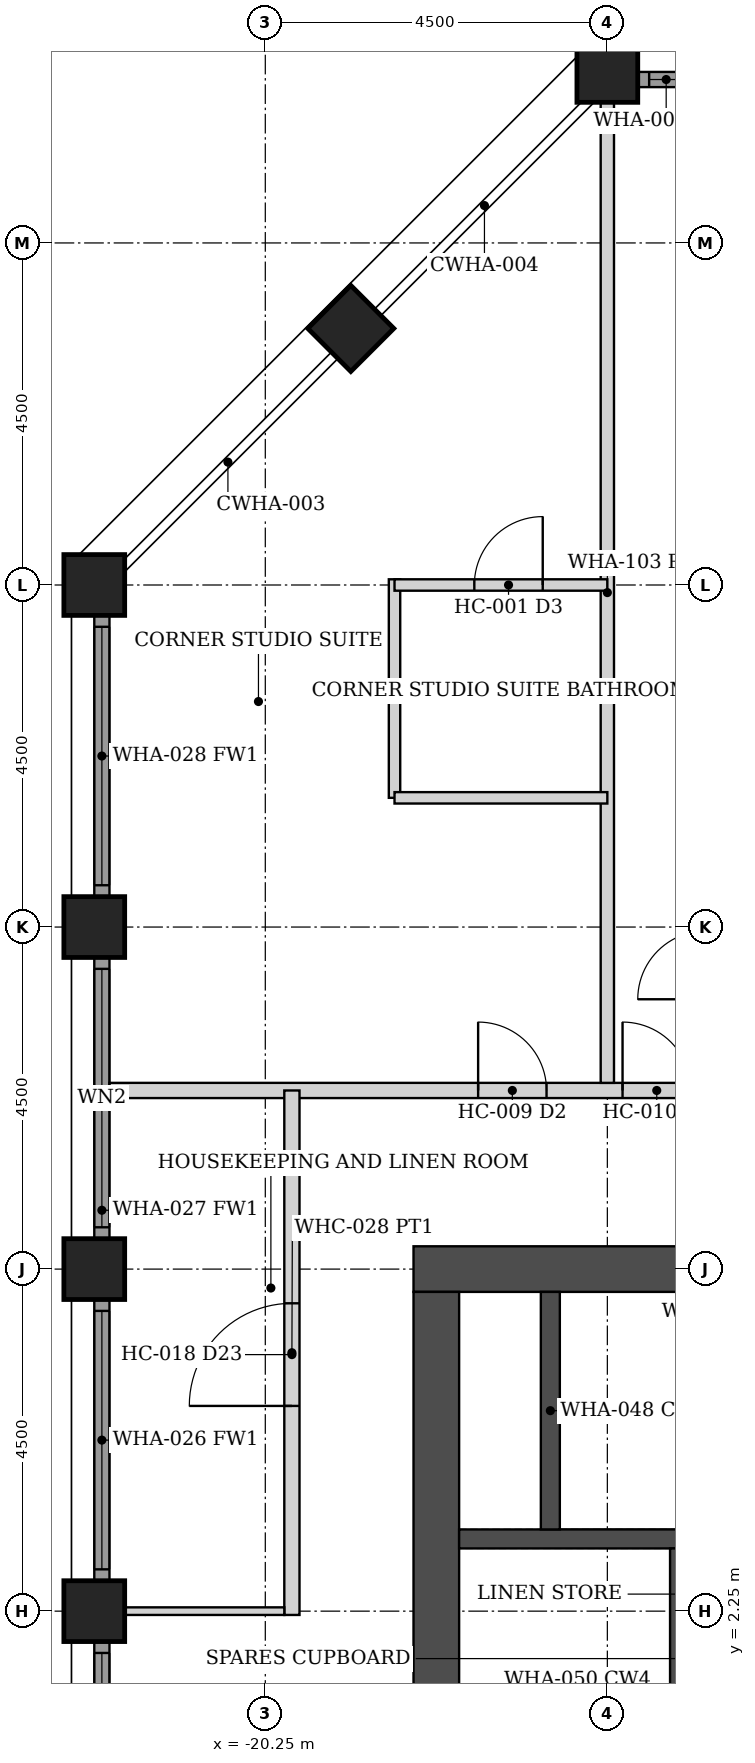
"""IFC4 building model, lengths in metres.
Left out: names, types, materials, properties, quantities, classifications, styles, units other than length and angle.
Written with IfcOpenShell. Run it as: python <this file> out.ifc"""

import sys

from ifc_helpers import new_model, si_unit, direction, frame, frame_2d, origin, origin_2d, place, context, subcontext, project, spatial, rectangle, hollow_rectangle, extrude, element, fill, save


model = new_model("IFC4")
c1 = context("Model", 3, precision=1e-05, world=origin(), true_north=direction((0.0, 1.0)))
c2 = subcontext(c1, "Body", "Model", "MODEL_VIEW")
j1 = project(units=[si_unit("LENGTHUNIT", "METRE"), si_unit("PLANEANGLEUNIT", "RADIAN")], contexts=[c1])
p1 = place(None, origin())
s1 = spatial("IfcSite", under=j1, at=p1, CompositionType="ELEMENT")
p2 = place(p1, origin())
s2 = spatial("IfcBuilding", under=s1, at=p2, CompositionType="ELEMENT")
p3 = place(p2, frame((0.0, 0.0, 140.0)))
s3 = spatial("IfcBuildingStorey", under=s2, at=p3, CompositionType="ELEMENT", Elevation=140.0)
for number, where, z_axis, x_axis in (
    (1, (-15.75, 22.5, 0.0), (0.0, 0.0, 1.0), (0.0, 1.0, 0.0)),
    (2, (-22.5, 2.25, 0.0), (0.0, 0.0, 1.0), (1.0, 0.0, 0.0)),
    (3, (-22.5, 6.75, 0.0), (0.0, 0.0, 1.0), (1.0, 0.0, 0.0)),
    (4, (-22.5, 11.25, 0.0), (0.0, 0.0, 1.0), (1.0, 0.0, 0.0)),
    (5, (-22.5, 15.75, 0.0), (0.0, 0.0, 1.0), (1.0, 0.0, 0.0)),
    (6, (-19.125, 19.125, 0.0), (0.0, 0.0, 1.0), (0.707, -0.707, 0.0)),
):
    element("IfcColumn", number, at=place(p3, frame(where, z_axis=z_axis, x_axis=x_axis)), inside=s3, PredefinedType="COLUMN", context=c2, shape_type="SweptSolid", body=[
        extrude(hollow_rectangle(XDim=0.8, YDim=0.8, WallThickness=0.05, at=origin_2d()), origin(), (0.0, 0.0, 1.0), 3.6),
    ])
p4 = place(p3, frame((-8.7, 6.75, 0.0), z_axis=(0.0, 0.0, 1.0), x_axis=(-1.0, 0.0, 0.0)))
e7 = element("IfcWall", 7, at=p4, inside=s3, PredefinedType="SHEAR", context=c2, shape_type="SweptSolid", body=[
    extrude(rectangle(XDim=9.6, YDim=0.6, at=frame_2d((4.8, 0.0))), origin(), (0.0, 0.0, 1.0), 3.6),
])
p5 = place(p3, frame((-18.0, -6.45, 0.0), z_axis=(0.0, 0.0, 1.0), x_axis=(0.0, 1.0, 0.0)))
e8 = element("IfcWall", 8, at=p5, inside=s3, PredefinedType="SHEAR", context=c2, shape_type="SweptSolid", body=[
    extrude(rectangle(XDim=12.9, YDim=0.6, at=frame_2d((6.45, 0.0))), origin(), (0.0, 0.0, 1.0), 3.6),
])
p6 = place(p3, frame((-9.3, 3.2, 0.0), z_axis=(0.0, 0.0, 1.0), x_axis=(-1.0, 0.0, 0.0)))
e9 = element("IfcWall", 9, at=p6, inside=s3, PredefinedType="SHEAR", context=c2, shape_type="SweptSolid", body=[
    extrude(rectangle(XDim=8.4, YDim=0.25, at=frame_2d((4.2, 0.0))), origin(), (0.0, 0.0, 1.0), 3.6),
])
p7 = place(p3, frame((-16.5, 3.325, 0.0), z_axis=(0.0, 0.0, 1.0), x_axis=(0.0, 1.0, 0.0)))
e10 = element("IfcWall", 10, at=p7, inside=s3, PredefinedType="SHEAR", context=c2, shape_type="SweptSolid", body=[
    extrude(rectangle(XDim=3.125, YDim=0.25, at=frame_2d((1.562, 0.0))), origin(), (0.0, 0.0, 1.0), 3.6),
])
p8 = place(p3, frame((-14.8, -3.075, 0.0), z_axis=(0.0, 0.0, 1.0), x_axis=(0.0, 1.0, 0.0)))
e11 = element("IfcWall", 11, at=p8, inside=s3, PredefinedType="SHEAR", context=c2, shape_type="SweptSolid", body=[
    extrude(rectangle(XDim=6.15, YDim=0.25, at=frame_2d((3.075, 0.0))), origin(), (0.0, 0.0, 1.0), 3.6),
])
p9 = place(p3, frame((-15.345, 22.4, 0.0), z_axis=(0.0, 0.0, 1.0), x_axis=(1.0, 0.0, 0.0)))
e12 = element("IfcWall", 12, at=p9, inside=s3, PredefinedType="SOLIDWALL", context=c2, shape_type="SweptSolid", body=[
    extrude(rectangle(XDim=3.69, YDim=0.2, at=frame_2d((1.845, 0.0))), origin(), (0.0, 0.0, 1.0), 2.479),
])
p10 = place(p9, frame((0.145, 0.0, 0.3)))
e13 = element("IfcOpeningElement", 13, at=p10, cuts=e12, PredefinedType="OPENING", context=c2, shape_type="SweptSolid", body=[
    extrude(rectangle(XDim=3.4, YDim=2.029, at=frame_2d((1.7, 1.015))), frame((0.0, 0.11, 0.0), z_axis=(0.0, -1.0, 0.0), x_axis=(1.0, 0.0, 0.0)), (0.0, 0.0, 1.0), 0.22),
])
p11 = place(p3, frame((-22.4, -1.845, 0.0), z_axis=(0.0, 0.0, 1.0), x_axis=(0.0, 1.0, 0.0)))
e14 = element("IfcWall", 14, at=p11, inside=s3, PredefinedType="SOLIDWALL", context=c2, shape_type="SweptSolid", body=[
    extrude(rectangle(XDim=3.69, YDim=0.2, at=frame_2d((1.845, 0.0))), origin(), (0.0, 0.0, 1.0), 2.479),
])
p12 = place(p11, frame((0.145, 0.0, 0.3)))
e15 = element("IfcOpeningElement", 15, at=p12, cuts=e14, PredefinedType="OPENING", context=c2, shape_type="SweptSolid", body=[
    extrude(rectangle(XDim=3.4, YDim=2.029, at=frame_2d((1.7, 1.015))), frame((0.0, 0.11, 0.0), z_axis=(0.0, -1.0, 0.0), x_axis=(1.0, 0.0, 0.0)), (0.0, 0.0, 1.0), 0.22),
])
p13 = place(p3, frame((-22.4, 2.655, 0.0), z_axis=(0.0, 0.0, 1.0), x_axis=(0.0, 1.0, 0.0)))
e16 = element("IfcWall", 16, at=p13, inside=s3, PredefinedType="SOLIDWALL", context=c2, shape_type="SweptSolid", body=[
    extrude(rectangle(XDim=3.69, YDim=0.2, at=frame_2d((1.845, 0.0))), origin(), (0.0, 0.0, 1.0), 2.479),
])
p14 = place(p13, frame((0.145, 0.0, 0.3)))
e17 = element("IfcOpeningElement", 17, at=p14, cuts=e16, PredefinedType="OPENING", context=c2, shape_type="SweptSolid", body=[
    extrude(rectangle(XDim=3.4, YDim=2.029, at=frame_2d((1.7, 1.015))), frame((0.0, 0.11, 0.0), z_axis=(0.0, -1.0, 0.0), x_axis=(1.0, 0.0, 0.0)), (0.0, 0.0, 1.0), 0.22),
])
p15 = place(p3, frame((-22.4, 7.155, 0.0), z_axis=(0.0, 0.0, 1.0), x_axis=(0.0, 1.0, 0.0)))
e18 = element("IfcWall", 18, at=p15, inside=s3, PredefinedType="SOLIDWALL", context=c2, shape_type="SweptSolid", body=[
    extrude(rectangle(XDim=3.69, YDim=0.2, at=frame_2d((1.845, 0.0))), origin(), (0.0, 0.0, 1.0), 2.479),
])
p16 = place(p15, frame((0.145, 0.0, 0.3)))
e19 = element("IfcOpeningElement", 19, at=p16, cuts=e18, PredefinedType="OPENING", context=c2, shape_type="SweptSolid", body=[
    extrude(rectangle(XDim=3.4, YDim=2.029, at=frame_2d((1.7, 1.015))), frame((0.0, 0.11, 0.0), z_axis=(0.0, -1.0, 0.0), x_axis=(1.0, 0.0, 0.0)), (0.0, 0.0, 1.0), 0.22),
])
p17 = place(p3, frame((-22.4, 11.655, 0.0), z_axis=(0.0, 0.0, 1.0), x_axis=(0.0, 1.0, 0.0)))
e20 = element("IfcWall", 20, at=p17, inside=s3, PredefinedType="SOLIDWALL", context=c2, shape_type="SweptSolid", body=[
    extrude(rectangle(XDim=3.69, YDim=0.2, at=frame_2d((1.845, 0.0))), origin(), (0.0, 0.0, 1.0), 2.479),
])
p18 = place(p17, frame((0.145, 0.0, 0.3)))
e21 = element("IfcOpeningElement", 21, at=p18, cuts=e20, PredefinedType="OPENING", context=c2, shape_type="SweptSolid", body=[
    extrude(rectangle(XDim=3.4, YDim=2.029, at=frame_2d((1.7, 1.015))), frame((0.0, 0.11, 0.0), z_axis=(0.0, -1.0, 0.0), x_axis=(1.0, 0.0, 0.0)), (0.0, 0.0, 1.0), 0.22),
])
p19 = place(p3, frame((-22.3, 9.1, 0.0), z_axis=(0.0, 0.0, 1.0), x_axis=(1.0, 0.0, 0.0)))
e22 = element("IfcWall", 22, at=p19, inside=s3, PredefinedType="PARTITIONING", context=c2, shape_type="SweptSolid", body=[
    extrude(rectangle(XDim=44.6, YDim=0.2, at=frame_2d((22.3, 0.0))), origin(), (0.0, 0.0, 1.0), 2.473),
])
p20 = place(p19, frame((6.75, 0.0, 0.0)))
e23 = element("IfcOpeningElement", 23, at=p20, cuts=e22, PredefinedType="OPENING", context=c2, shape_type="SweptSolid", body=[
    extrude(rectangle(XDim=0.9, YDim=2.1, at=frame_2d((0.45, 1.05))), frame((0.0, 0.11, 0.0), z_axis=(0.0, -1.0, 0.0), x_axis=(1.0, 0.0, 0.0)), (0.0, 0.0, 1.0), 0.22),
])
p21 = place(p19, frame((14.45, 0.0, 0.0)))
e24 = element("IfcOpeningElement", 24, at=p21, cuts=e22, PredefinedType="OPENING", context=c2, shape_type="SweptSolid", body=[
    extrude(rectangle(XDim=0.9, YDim=2.1, at=frame_2d((0.45, 1.05))), frame((0.0, 0.11, 0.0), z_axis=(0.0, -1.0, 0.0), x_axis=(1.0, 0.0, 0.0)), (0.0, 0.0, 1.0), 0.22),
])
p22 = place(p19, frame((15.75, 0.0, 0.0)))
e25 = element("IfcOpeningElement", 25, at=p22, cuts=e22, PredefinedType="OPENING", context=c2, shape_type="SweptSolid", body=[
    extrude(rectangle(XDim=0.9, YDim=2.1, at=frame_2d((0.45, 1.05))), frame((0.0, 0.11, 0.0), z_axis=(0.0, -1.0, 0.0), x_axis=(1.0, 0.0, 0.0)), (0.0, 0.0, 1.0), 0.22),
])
p23 = place(p19, frame((23.45, 0.0, 0.0)))
e26 = element("IfcOpeningElement", 26, at=p23, cuts=e22, PredefinedType="OPENING", context=c2, shape_type="SweptSolid", body=[
    extrude(rectangle(XDim=0.9, YDim=2.1, at=frame_2d((0.45, 1.05))), frame((0.0, 0.11, 0.0), z_axis=(0.0, -1.0, 0.0), x_axis=(1.0, 0.0, 0.0)), (0.0, 0.0, 1.0), 0.22),
])
p24 = place(p19, frame((24.75, 0.0, 0.0)))
e27 = element("IfcOpeningElement", 27, at=p24, cuts=e22, PredefinedType="OPENING", context=c2, shape_type="SweptSolid", body=[
    extrude(rectangle(XDim=0.9, YDim=2.1, at=frame_2d((0.45, 1.05))), frame((0.0, 0.11, 0.0), z_axis=(0.0, -1.0, 0.0), x_axis=(1.0, 0.0, 0.0)), (0.0, 0.0, 1.0), 0.22),
])
p25 = place(p19, frame((36.95, 0.0, 0.0)))
e28 = element("IfcOpeningElement", 28, at=p25, cuts=e22, PredefinedType="OPENING", context=c2, shape_type="SweptSolid", body=[
    extrude(rectangle(XDim=0.9, YDim=2.1, at=frame_2d((0.45, 1.05))), frame((0.0, 0.11, 0.0), z_axis=(0.0, -1.0, 0.0), x_axis=(1.0, 0.0, 0.0)), (0.0, 0.0, 1.0), 0.22),
])
p26 = place(p19, frame((38.85, 0.0, 0.0)))
e29 = element("IfcOpeningElement", 29, at=p26, cuts=e22, PredefinedType="OPENING", context=c2, shape_type="SweptSolid", body=[
    extrude(rectangle(XDim=0.9, YDim=2.1, at=frame_2d((0.45, 1.05))), frame((0.0, 0.11, 0.0), z_axis=(0.0, -1.0, 0.0), x_axis=(1.0, 0.0, 0.0)), (0.0, 0.0, 1.0), 0.22),
])
p27 = place(p19, frame((4.85, 0.0, 0.0)))
e30 = element("IfcOpeningElement", 30, at=p27, cuts=e22, PredefinedType="OPENING", context=c2, shape_type="SweptSolid", body=[
    extrude(rectangle(XDim=0.9, YDim=2.1, at=frame_2d((0.45, 1.05))), frame((0.0, 0.11, 0.0), z_axis=(0.0, -1.0, 0.0), x_axis=(1.0, 0.0, 0.0)), (0.0, 0.0, 1.0), 0.22),
])
p28 = place(p3, frame((-19.9, 2.2, 0.0), z_axis=(0.0, 0.0, 1.0), x_axis=(0.0, 1.0, 0.0)))
e31 = element("IfcWall", 31, at=p28, inside=s3, PredefinedType="PARTITIONING", context=c2, shape_type="SweptSolid", body=[
    extrude(rectangle(XDim=6.9, YDim=0.2, at=frame_2d((3.45, 0.0))), origin(), (0.0, 0.0, 1.0), 2.473),
])
p29 = place(p28, frame((2.75, 0.0, 0.0)))
e32 = element("IfcOpeningElement", 32, at=p29, cuts=e31, PredefinedType="OPENING", context=c2, shape_type="SweptSolid", body=[
    extrude(rectangle(XDim=1.35, YDim=2.1, at=frame_2d((0.675, 1.05))), frame((0.0, 0.11, 0.0), z_axis=(0.0, -1.0, 0.0), x_axis=(1.0, 0.0, 0.0)), (0.0, 0.0, 1.0), 0.22),
])
p30 = place(p3, frame((-15.75, 9.2, 0.0), z_axis=(0.0, 0.0, 1.0), x_axis=(0.0, 1.0, 0.0)))
e33 = element("IfcWall", 33, at=p30, inside=s3, PredefinedType="PARTITIONING", context=c2, shape_type="SweptSolid", body=[
    extrude(rectangle(XDim=12.9, YDim=0.175, at=frame_2d((6.45, 0.0))), origin(), (0.0, 0.0, 1.0), 2.473),
])
p31 = place(p3, frame((-18.55, 12.95, 0.0), z_axis=(0.0, 0.0, 1.0), x_axis=(0.0, 1.0, 0.0)))
e34 = element("IfcWall", 34, at=p31, inside=s3, PredefinedType="PARTITIONING", context=c2, shape_type="SweptSolid", body=[
    extrude(rectangle(XDim=2.875, YDim=0.15, at=frame_2d((1.438, 0.0))), origin(), (0.0, 0.0, 1.0), 2.473),
])
p32 = place(p3, frame((-18.55, 12.95, 0.0), z_axis=(0.0, 0.0, 1.0), x_axis=(1.0, 0.0, 0.0)))
e35 = element("IfcWall", 35, at=p32, inside=s3, PredefinedType="PARTITIONING", context=c2, shape_type="SweptSolid", body=[
    extrude(rectangle(XDim=2.8, YDim=0.15, at=frame_2d((1.4, 0.0))), origin(), (0.0, 0.0, 1.0), 2.473),
])
p33 = place(p3, frame((-18.55, 15.75, 0.0), z_axis=(0.0, 0.0, 1.0), x_axis=(1.0, 0.0, 0.0)))
e36 = element("IfcWall", 36, at=p33, inside=s3, PredefinedType="PARTITIONING", context=c2, shape_type="SweptSolid", body=[
    extrude(rectangle(XDim=2.8, YDim=0.15, at=frame_2d((1.4, 0.0))), origin(), (0.0, 0.0, 1.0), 2.473),
])
p34 = place(p33, frame((1.05, 0.0, 0.0)))
e37 = element("IfcOpeningElement", 37, at=p34, cuts=e36, PredefinedType="OPENING", context=c2, shape_type="SweptSolid", body=[
    extrude(rectangle(XDim=0.9, YDim=2.1, at=frame_2d((0.45, 1.05))), frame((0.0, 0.085, 0.0), z_axis=(0.0, -1.0, 0.0), x_axis=(1.0, 0.0, 0.0)), (0.0, 0.0, 1.0), 0.17),
])
p35 = place(p3, frame((-22.1, 2.25, 0.0), z_axis=(0.0, 0.0, 1.0), x_axis=(1.0, 0.0, 0.0)))
e38 = element("IfcWall", 38, at=p35, inside=s3, PredefinedType="PARTITIONING", context=c2, shape_type="SweptSolid", body=[
    extrude(rectangle(XDim=2.1, YDim=0.1, at=frame_2d((1.05, 0.0))), origin(), (0.0, 0.0, 1.0), 2.473),
])
p36 = place(p10, origin())
e39 = element("IfcWindow", 39, at=p36, inside=s3, PartitioningType="SINGLE_PANEL", PredefinedType="WINDOW", context=c2, shape_type="SweptSolid", body=[
    extrude(rectangle(XDim=3.4, YDim=2.029, at=frame_2d((1.7, 1.015))), frame((0.0, 0.03, 0.0), z_axis=(0.0, -1.0, 0.0), x_axis=(1.0, 0.0, 0.0)), (0.0, 0.0, 1.0), 0.06),
])
fill(e13, e39)
p37 = place(p12, origin())
e40 = element("IfcWindow", 40, at=p37, inside=s3, PartitioningType="SINGLE_PANEL", PredefinedType="WINDOW", context=c2, shape_type="SweptSolid", body=[
    extrude(rectangle(XDim=3.4, YDim=2.029, at=frame_2d((1.7, 1.015))), frame((0.0, 0.03, 0.0), z_axis=(0.0, -1.0, 0.0), x_axis=(1.0, 0.0, 0.0)), (0.0, 0.0, 1.0), 0.06),
])
fill(e15, e40)
p38 = place(p14, origin())
e41 = element("IfcWindow", 41, at=p38, inside=s3, PartitioningType="SINGLE_PANEL", PredefinedType="WINDOW", context=c2, shape_type="SweptSolid", body=[
    extrude(rectangle(XDim=3.4, YDim=2.029, at=frame_2d((1.7, 1.015))), frame((0.0, 0.03, 0.0), z_axis=(0.0, -1.0, 0.0), x_axis=(1.0, 0.0, 0.0)), (0.0, 0.0, 1.0), 0.06),
])
fill(e17, e41)
p39 = place(p16, origin())
e42 = element("IfcWindow", 42, at=p39, inside=s3, PartitioningType="SINGLE_PANEL", PredefinedType="WINDOW", context=c2, shape_type="SweptSolid", body=[
    extrude(rectangle(XDim=3.4, YDim=2.029, at=frame_2d((1.7, 1.015))), frame((0.0, 0.03, 0.0), z_axis=(0.0, -1.0, 0.0), x_axis=(1.0, 0.0, 0.0)), (0.0, 0.0, 1.0), 0.06),
])
fill(e19, e42)
p40 = place(p18, origin())
e43 = element("IfcWindow", 43, at=p40, inside=s3, PartitioningType="SINGLE_PANEL", PredefinedType="WINDOW", context=c2, shape_type="SweptSolid", body=[
    extrude(rectangle(XDim=3.4, YDim=2.029, at=frame_2d((1.7, 1.015))), frame((0.0, 0.03, 0.0), z_axis=(0.0, -1.0, 0.0), x_axis=(1.0, 0.0, 0.0)), (0.0, 0.0, 1.0), 0.06),
])
fill(e21, e43)
p41 = place(p20, origin())
e44 = element("IfcDoor", 44, at=p41, inside=s3, OperationType="SINGLE_SWING_LEFT", PredefinedType="DOOR", context=c2, shape_type="SweptSolid", body=[
    extrude(rectangle(XDim=0.9, YDim=2.1, at=frame_2d((0.45, 1.05))), frame((0.0, 0.025, 0.0), z_axis=(0.0, -1.0, 0.0), x_axis=(1.0, 0.0, 0.0)), (0.0, 0.0, 1.0), 0.05),
])
fill(e23, e44)
p42 = place(p27, origin())
e45 = element("IfcDoor", 45, at=p42, inside=s3, OperationType="SINGLE_SWING_LEFT", PredefinedType="DOOR", context=c2, shape_type="SweptSolid", body=[
    extrude(rectangle(XDim=0.9, YDim=2.1, at=frame_2d((0.45, 1.05))), frame((0.0, 0.025, 0.0), z_axis=(0.0, -1.0, 0.0), x_axis=(1.0, 0.0, 0.0)), (0.0, 0.0, 1.0), 0.05),
])
fill(e30, e45)
p43 = place(p34, origin())
e46 = element("IfcDoor", 46, at=p43, inside=s3, OperationType="SINGLE_SWING_RIGHT", PredefinedType="DOOR", context=c2, shape_type="SweptSolid", body=[
    extrude(rectangle(XDim=0.9, YDim=2.1, at=frame_2d((0.45, 1.05))), frame((0.0, 0.025, 0.0), z_axis=(0.0, -1.0, 0.0), x_axis=(1.0, 0.0, 0.0)), (0.0, 0.0, 1.0), 0.05),
])
fill(e37, e46)
p44 = place(p29, origin())
e47 = element("IfcDoor", 47, at=p44, inside=s3, OperationType="SINGLE_SWING_LEFT", PredefinedType="DOOR", context=c2, shape_type="SweptSolid", body=[
    extrude(rectangle(XDim=1.35, YDim=2.1, at=frame_2d((0.675, 1.05))), frame((0.0, 0.025, 0.0), z_axis=(0.0, -1.0, 0.0), x_axis=(1.0, 0.0, 0.0)), (0.0, 0.0, 1.0), 0.05),
])
fill(e32, e47)
save(model, sys.argv[1])
